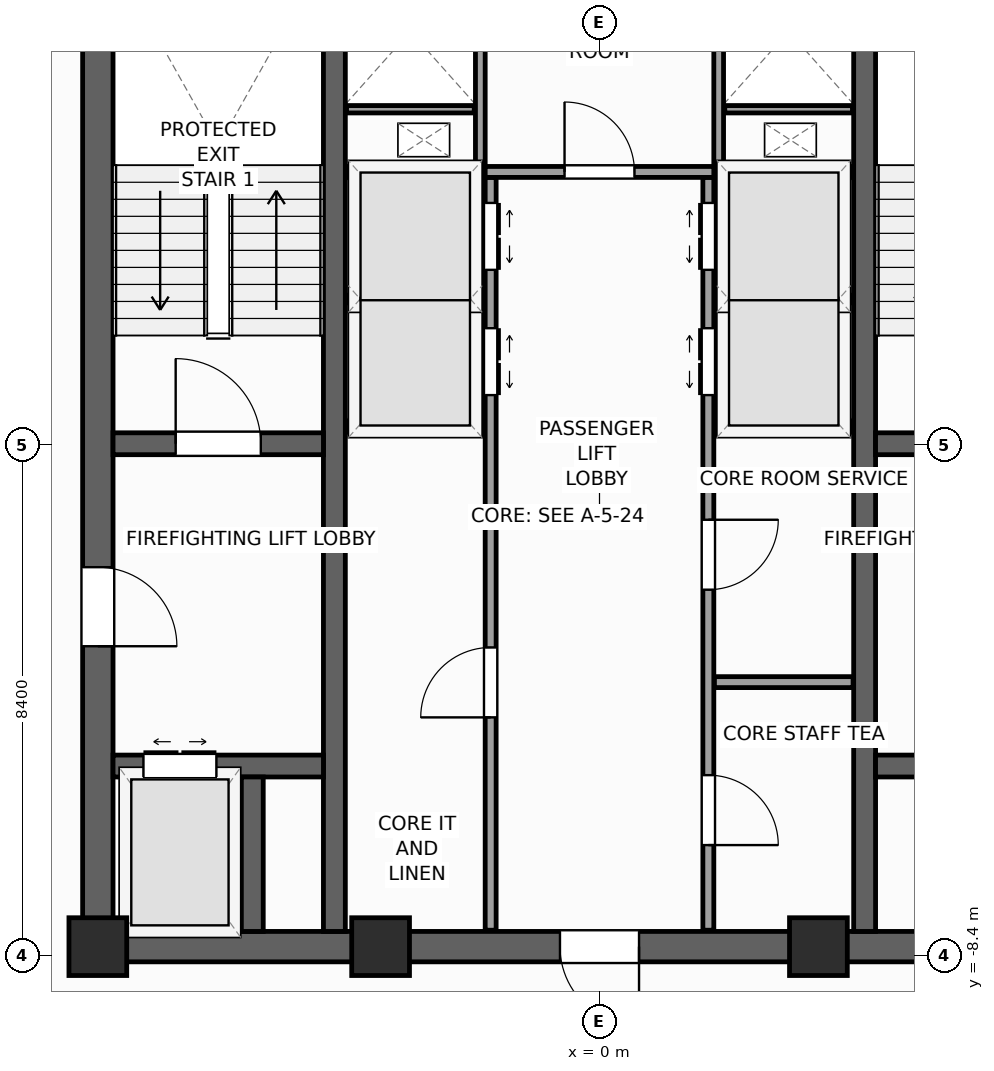
"""IFC4 building model, lengths in metres.
Left out: names, types, materials, properties, quantities, classifications, styles, units other than length and angle.
Written with IfcOpenShell. Run it as: python <this file> out.ifc"""

import sys

from ifc_helpers import new_model, si_unit, direction, frame, frame_2d, origin, origin_2d, place, context, subcontext, project, spatial, rectangle, extrude, source, transform, mapped, element, fill, save


model = new_model("IFC4")
c1 = context("Model", 3, precision=1e-05, world=origin(), true_north=direction((0.0, 1.0)))
c2 = subcontext(c1, "Body", "Model", "MODEL_VIEW")
j1 = project(units=[si_unit("LENGTHUNIT", "METRE"), si_unit("PLANEANGLEUNIT", "RADIAN")], contexts=[c1])
p1 = place(None, origin())
s1 = spatial("IfcSite", under=j1, at=p1, CompositionType="ELEMENT")
p2 = place(p1, origin())
s2 = spatial("IfcBuilding", under=s1, at=p2, CompositionType="ELEMENT")
p3 = place(p2, frame((0.0, 0.0, 252.4)))
s3 = spatial("IfcBuildingStorey", under=s2, at=p3, CompositionType="ELEMENT", Elevation=252.4)
p4 = place(p3, frame((-8.5, -8.25, 0.0), z_axis=(0.0, 0.0, 1.0), x_axis=(1.0, 0.0, 0.0)))
e1 = element("IfcWall", 1, at=p4, inside=s3, PredefinedType="SHEAR", context=c2, shape_type="SweptSolid", body=[
    extrude(rectangle(XDim=17.0, YDim=0.5, at=frame_2d((8.5, 0.0))), origin(), (0.0, 0.0, 1.0), 3.9),
])
p5 = place(p4, frame((7.85, 0.0, 0.0)))
e2 = element("IfcOpeningElement", 2, at=p5, cuts=e1, PredefinedType="OPENING", context=c2, shape_type="SweptSolid", body=[
    extrude(rectangle(XDim=1.3, YDim=2.2, at=frame_2d((0.65, 1.1))), frame((0.0, 0.26, 0.0), z_axis=(0.0, -1.0, 0.0), x_axis=(1.0, 0.0, 0.0)), (0.0, 0.0, 1.0), 0.52),
])
p6 = place(p3, frame((-8.25, -8.0, 0.0), z_axis=(0.0, 0.0, 1.0), x_axis=(0.0, 1.0, 0.0)))
e3 = element("IfcWall", 3, at=p6, inside=s3, PredefinedType="SHEAR", context=c2, shape_type="SweptSolid", body=[
    extrude(rectangle(XDim=16.0, YDim=0.5, at=frame_2d((8.0, 0.0))), origin(), (0.0, 0.0, 1.0), 3.9),
])
p7 = place(p6, frame((4.69, 0.0, 0.0)))
e4 = element("IfcOpeningElement", 4, at=p7, cuts=e3, PredefinedType="OPENING", context=c2, shape_type="SweptSolid", body=[
    extrude(rectangle(XDim=1.3, YDim=2.2, at=frame_2d((0.65, 1.1))), frame((0.0, 0.26, 0.0), z_axis=(0.0, -1.0, 0.0), x_axis=(1.0, 0.0, 0.0)), (0.0, 0.0, 1.0), 0.52),
])
for number, where, z_axis, x_axis in (
    (5, (-4.36, -8.0, 0.0), (0.0, 0.0, 1.0), (0.0, 1.0, 0.0)),
    (6, (4.36, -8.0, 0.0), (0.0, 0.0, 1.0), (0.0, 1.0, 0.0)),
):
    element("IfcWall", number, at=place(p3, frame(where, z_axis=z_axis, x_axis=x_axis)), inside=s3, PredefinedType="SHEAR", context=c2, shape_type="SweptSolid", body=[
        extrude(rectangle(XDim=16.0, YDim=0.36, at=frame_2d((8.0, 0.0))), origin(), (0.0, 0.0, 1.0), 3.9),
    ])
p8 = place(p3, frame((-8.0, 0.02, 0.0), z_axis=(0.0, 0.0, 1.0), x_axis=(1.0, 0.0, 0.0)))
e7 = element("IfcWall", 7, at=p8, inside=s3, PredefinedType="SHEAR", context=c2, shape_type="SweptSolid", body=[
    extrude(rectangle(XDim=3.46, YDim=0.36, at=frame_2d((1.73, 0.0))), origin(), (0.0, 0.0, 1.0), 3.9),
])
p9 = place(p8, frame((1.03, 0.0, 0.0)))
e8 = element("IfcOpeningElement", 8, at=p9, cuts=e7, PredefinedType="OPENING", context=c2, shape_type="SweptSolid", body=[
    extrude(rectangle(XDim=1.4, YDim=2.2, at=frame_2d((0.7, 1.1))), frame((0.0, 0.19, 0.0), z_axis=(0.0, -1.0, 0.0), x_axis=(1.0, 0.0, 0.0)), (0.0, 0.0, 1.0), 0.38),
])
p10 = place(p3, frame((4.54, 0.02, 0.0), z_axis=(0.0, 0.0, 1.0), x_axis=(1.0, 0.0, 0.0)))
e9 = element("IfcWall", 9, at=p10, inside=s3, PredefinedType="SHEAR", context=c2, shape_type="SweptSolid", body=[
    extrude(rectangle(XDim=3.46, YDim=0.36, at=frame_2d((1.73, 0.0))), origin(), (0.0, 0.0, 1.0), 3.9),
])
p11 = place(p10, frame((1.03, 0.0, 0.0)))
e10 = element("IfcOpeningElement", 10, at=p11, cuts=e9, PredefinedType="OPENING", context=c2, shape_type="SweptSolid", body=[
    extrude(rectangle(XDim=1.4, YDim=2.2, at=frame_2d((0.7, 1.1))), frame((0.0, 0.19, 0.0), z_axis=(0.0, -1.0, 0.0), x_axis=(1.0, 0.0, 0.0)), (0.0, 0.0, 1.0), 0.38),
])
p12 = place(p3, frame((-8.0, -5.28, 0.0), z_axis=(0.0, 0.0, 1.0), x_axis=(1.0, 0.0, 0.0)))
e11 = element("IfcWall", 11, at=p12, inside=s3, PredefinedType="SHEAR", context=c2, shape_type="SweptSolid", body=[
    extrude(rectangle(XDim=3.46, YDim=0.36, at=frame_2d((1.73, 0.0))), origin(), (0.0, 0.0, 1.0), 3.9),
])
p13 = place(p12, frame((0.5, 0.0, 0.0)))
e12 = element("IfcOpeningElement", 12, at=p13, cuts=e11, PredefinedType="OPENING", context=c2, shape_type="SweptSolid", body=[
    extrude(rectangle(XDim=1.2, YDim=2.25, at=frame_2d((0.6, 1.125))), frame((0.0, 0.19, 0.0), z_axis=(0.0, -1.0, 0.0), x_axis=(1.0, 0.0, 0.0)), (0.0, 0.0, 1.0), 0.38),
])
p14 = place(p3, frame((4.54, -5.28, 0.0), z_axis=(0.0, 0.0, 1.0), x_axis=(1.0, 0.0, 0.0)))
e13 = element("IfcWall", 13, at=p14, inside=s3, PredefinedType="SHEAR", context=c2, shape_type="SweptSolid", body=[
    extrude(rectangle(XDim=3.46, YDim=0.36, at=frame_2d((1.73, 0.0))), origin(), (0.0, 0.0, 1.0), 3.9),
])
p15 = place(p14, frame((1.76, 0.0, 0.0)))
e14 = element("IfcOpeningElement", 14, at=p15, cuts=e13, PredefinedType="OPENING", context=c2, shape_type="SweptSolid", body=[
    extrude(rectangle(XDim=1.2, YDim=2.25, at=frame_2d((0.6, 1.125))), frame((0.0, 0.19, 0.0), z_axis=(0.0, -1.0, 0.0), x_axis=(1.0, 0.0, 0.0)), (0.0, 0.0, 1.0), 0.38),
])
p16 = place(p3, frame((-5.71, -8.0, 0.0), z_axis=(0.0, 0.0, 1.0), x_axis=(0.0, 1.0, 0.0)))
e15 = element("IfcWall", 15, at=p16, inside=s3, PredefinedType="SHEAR", context=c2, shape_type="SweptSolid", body=[
    extrude(rectangle(XDim=2.54, YDim=0.36, at=frame_2d((1.27, 0.0))), origin(), (0.0, 0.0, 1.0), 3.9),
])
m1 = source(origin(), c2, "Body", "SweptSolid", [
    extrude(rectangle(XDim=0.95, YDim=0.95, at=origin_2d()), origin(), (0.0, 0.0, 1.0), 3.9),
])
for number, where, z_axis, x_axis in (
    (16, (-8.25, -8.25, 0.0), (0.0, 0.0, 1.0), (1.0, 0.0, 0.0)),
    (17, (-3.6, -8.25, 0.0), (0.0, 0.0, 1.0), (1.0, 0.0, 0.0)),
    (18, (3.6, -8.25, 0.0), (0.0, 0.0, 1.0), (1.0, 0.0, 0.0)),
):
    element("IfcColumn", number, at=place(p3, frame(where, z_axis=z_axis, x_axis=x_axis)), inside=s3, PredefinedType="PILASTER", context=c2, shape_type="MappedRepresentation", body=[
        mapped(m1, transform((0.0, 0.0, 0.0), scale=1.0)),
    ])
p17 = place(p3, frame((-6.733, 29.154, 0.0), z_axis=(0.0, 0.0, 1.0), x_axis=(-0.629325378072, -0.77714192302, 0.0)))
e19 = element("IfcWall", 19, at=p17, inside=s3, PredefinedType="STANDARD", context=c2, shape_type="SweptSolid", body=[
    extrude(rectangle(XDim=36.84, YDim=0.34, at=frame_2d((18.42, 0.0))), origin(), (0.0, 0.0, 1.0), 2.96),
])
p18 = place(p17, frame((3.721, 0.0, 0.48)))
e20 = element("IfcOpeningElement", 20, at=p18, cuts=e19, PredefinedType="OPENING", context=c2, shape_type="SweptSolid", body=[
    extrude(rectangle(XDim=1.4, YDim=2.4, at=frame_2d((0.7, 1.2))), frame((0.0, 0.18, 0.0), z_axis=(0.0, -1.0, 0.0), x_axis=(1.0, 0.0, 0.0)), (0.0, 0.0, 1.0), 0.36),
])
p19 = place(p17, frame((10.559, 0.0, 0.58)))
e21 = element("IfcOpeningElement", 21, at=p19, cuts=e19, PredefinedType="OPENING", context=c2, shape_type="SweptSolid", body=[
    extrude(rectangle(XDim=1.75, YDim=2.3, at=frame_2d((0.875, 1.15))), frame((0.0, 0.18, 0.0), z_axis=(0.0, -1.0, 0.0), x_axis=(1.0, 0.0, 0.0)), (0.0, 0.0, 1.0), 0.36),
])
p20 = place(p17, frame((16.058, 0.0, 0.58)))
e22 = element("IfcOpeningElement", 22, at=p20, cuts=e19, PredefinedType="OPENING", context=c2, shape_type="SweptSolid", body=[
    extrude(rectangle(XDim=1.75, YDim=2.3, at=frame_2d((0.875, 1.15))), frame((0.0, 0.18, 0.0), z_axis=(0.0, -1.0, 0.0), x_axis=(1.0, 0.0, 0.0)), (0.0, 0.0, 1.0), 0.36),
])
p21 = place(p17, frame((24.176, 0.0, 0.58)))
e23 = element("IfcOpeningElement", 23, at=p21, cuts=e19, PredefinedType="OPENING", context=c2, shape_type="SweptSolid", body=[
    extrude(rectangle(XDim=1.75, YDim=2.3, at=frame_2d((0.875, 1.15))), frame((0.0, 0.18, 0.0), z_axis=(0.0, -1.0, 0.0), x_axis=(1.0, 0.0, 0.0)), (0.0, 0.0, 1.0), 0.36),
])
p22 = place(p17, frame((30.232, 0.0, 0.48)))
e24 = element("IfcOpeningElement", 24, at=p22, cuts=e19, PredefinedType="OPENING", context=c2, shape_type="SweptSolid", body=[
    extrude(rectangle(XDim=1.4, YDim=2.4, at=frame_2d((0.7, 1.2))), frame((0.0, 0.18, 0.0), z_axis=(0.0, -1.0, 0.0), x_axis=(1.0, 0.0, 0.0)), (0.0, 0.0, 1.0), 0.36),
])
p23 = place(p3, frame((-29.154, -6.733, 0.0), z_axis=(0.0, 0.0, 1.0), x_axis=(0.77714192302, -0.629325378072, 0.0)))
e25 = element("IfcWall", 25, at=p23, inside=s3, PredefinedType="STANDARD", context=c2, shape_type="SweptSolid", body=[
    extrude(rectangle(XDim=36.84, YDim=0.34, at=frame_2d((18.42, 0.0))), origin(), (0.0, 0.0, 1.0), 2.96),
])
p24 = place(p23, frame((23.495, 0.0, 0.0)))
e26 = element("IfcOpeningElement", 26, at=p24, cuts=e25, PredefinedType="OPENING", context=c2, shape_type="SweptSolid", body=[
    extrude(rectangle(XDim=1.05, YDim=2.25, at=frame_2d((0.525, 1.125))), frame((0.0, 0.18, 0.0), z_axis=(0.0, -1.0, 0.0), x_axis=(1.0, 0.0, 0.0)), (0.0, 0.0, 1.0), 0.36),
])
p25 = place(p23, frame((3.721, 0.0, 0.48)))
e27 = element("IfcOpeningElement", 27, at=p25, cuts=e25, PredefinedType="OPENING", context=c2, shape_type="SweptSolid", body=[
    extrude(rectangle(XDim=1.4, YDim=2.4, at=frame_2d((0.7, 1.2))), frame((0.0, 0.18, 0.0), z_axis=(0.0, -1.0, 0.0), x_axis=(1.0, 0.0, 0.0)), (0.0, 0.0, 1.0), 0.36),
])
p26 = place(p23, frame((9.809, 0.0, 0.58)))
e28 = element("IfcOpeningElement", 28, at=p26, cuts=e25, PredefinedType="OPENING", context=c2, shape_type="SweptSolid", body=[
    extrude(rectangle(XDim=1.75, YDim=2.3, at=frame_2d((0.875, 1.15))), frame((0.0, 0.18, 0.0), z_axis=(0.0, -1.0, 0.0), x_axis=(1.0, 0.0, 0.0)), (0.0, 0.0, 1.0), 0.36),
])
p27 = place(p23, frame((16.058, 0.0, 0.58)))
e29 = element("IfcOpeningElement", 29, at=p27, cuts=e25, PredefinedType="OPENING", context=c2, shape_type="SweptSolid", body=[
    extrude(rectangle(XDim=1.75, YDim=2.3, at=frame_2d((0.875, 1.15))), frame((0.0, 0.18, 0.0), z_axis=(0.0, -1.0, 0.0), x_axis=(1.0, 0.0, 0.0)), (0.0, 0.0, 1.0), 0.36),
])
p28 = place(p23, frame((25.676, 0.0, 0.58)))
e30 = element("IfcOpeningElement", 30, at=p28, cuts=e25, PredefinedType="OPENING", context=c2, shape_type="SweptSolid", body=[
    extrude(rectangle(XDim=1.75, YDim=2.3, at=frame_2d((0.875, 1.15))), frame((0.0, 0.18, 0.0), z_axis=(0.0, -1.0, 0.0), x_axis=(1.0, 0.0, 0.0)), (0.0, 0.0, 1.0), 0.36),
])
p29 = place(p23, frame((30.982, 0.0, 0.48)))
e31 = element("IfcOpeningElement", 31, at=p29, cuts=e25, PredefinedType="OPENING", context=c2, shape_type="SweptSolid", body=[
    extrude(rectangle(XDim=1.4, YDim=2.4, at=frame_2d((0.7, 1.2))), frame((0.0, 0.18, 0.0), z_axis=(0.0, -1.0, 0.0), x_axis=(1.0, 0.0, 0.0)), (0.0, 0.0, 1.0), 0.36),
])
p30 = place(p3, frame((-1.79, -7.98, 0.0), z_axis=(0.0, 0.0, 1.0), x_axis=(0.0, 1.0, 0.0)))
e32 = element("IfcWall", 32, at=p30, inside=s3, PredefinedType="PARTITIONING", context=c2, shape_type="SweptSolid", body=[
    extrude(rectangle(XDim=12.38, YDim=0.18, at=frame_2d((6.19, 0.0))), origin(), (0.0, 0.0, 1.0), 3.66),
])
p31 = place(p30, frame((8.8, 0.0, 0.0)))
e33 = element("IfcOpeningElement", 33, at=p31, cuts=e32, PredefinedType="OPENING", context=c2, shape_type="SweptSolid", body=[
    extrude(rectangle(XDim=1.1, YDim=2.2, at=frame_2d((0.55, 1.1))), frame((0.0, 0.1, 0.0), z_axis=(0.0, -1.0, 0.0), x_axis=(1.0, 0.0, 0.0)), (0.0, 0.0, 1.0), 0.2),
])
p32 = place(p30, frame((10.86, 0.0, 0.0)))
e34 = element("IfcOpeningElement", 34, at=p32, cuts=e32, PredefinedType="OPENING", context=c2, shape_type="SweptSolid", body=[
    extrude(rectangle(XDim=1.1, YDim=2.2, at=frame_2d((0.55, 1.1))), frame((0.0, 0.1, 0.0), z_axis=(0.0, -1.0, 0.0), x_axis=(1.0, 0.0, 0.0)), (0.0, 0.0, 1.0), 0.2),
])
p33 = place(p30, frame((3.5, 0.0, 0.0)))
e35 = element("IfcOpeningElement", 35, at=p33, cuts=e32, PredefinedType="OPENING", context=c2, shape_type="SweptSolid", body=[
    extrude(rectangle(XDim=1.15, YDim=2.25, at=frame_2d((0.575, 1.125))), frame((0.0, 0.1, 0.0), z_axis=(0.0, -1.0, 0.0), x_axis=(1.0, 0.0, 0.0)), (0.0, 0.0, 1.0), 0.2),
])
p34 = place(p3, frame((1.79, -7.98, 0.0), z_axis=(0.0, 0.0, 1.0), x_axis=(0.0, 1.0, 0.0)))
e36 = element("IfcWall", 36, at=p34, inside=s3, PredefinedType="PARTITIONING", context=c2, shape_type="SweptSolid", body=[
    extrude(rectangle(XDim=12.38, YDim=0.18, at=frame_2d((6.19, 0.0))), origin(), (0.0, 0.0, 1.0), 3.66),
])
p35 = place(p34, frame((8.8, 0.0, 0.0)))
e37 = element("IfcOpeningElement", 37, at=p35, cuts=e36, PredefinedType="OPENING", context=c2, shape_type="SweptSolid", body=[
    extrude(rectangle(XDim=1.1, YDim=2.2, at=frame_2d((0.55, 1.1))), frame((0.0, 0.1, 0.0), z_axis=(0.0, -1.0, 0.0), x_axis=(1.0, 0.0, 0.0)), (0.0, 0.0, 1.0), 0.2),
])
p36 = place(p34, frame((10.86, 0.0, 0.0)))
e38 = element("IfcOpeningElement", 38, at=p36, cuts=e36, PredefinedType="OPENING", context=c2, shape_type="SweptSolid", body=[
    extrude(rectangle(XDim=1.1, YDim=2.2, at=frame_2d((0.55, 1.1))), frame((0.0, 0.1, 0.0), z_axis=(0.0, -1.0, 0.0), x_axis=(1.0, 0.0, 0.0)), (0.0, 0.0, 1.0), 0.2),
])
p37 = place(p34, frame((1.4, 0.0, 0.0)))
e39 = element("IfcOpeningElement", 39, at=p37, cuts=e36, PredefinedType="OPENING", context=c2, shape_type="SweptSolid", body=[
    extrude(rectangle(XDim=1.15, YDim=2.25, at=frame_2d((0.575, 1.125))), frame((0.0, 0.1, 0.0), z_axis=(0.0, -1.0, 0.0), x_axis=(1.0, 0.0, 0.0)), (0.0, 0.0, 1.0), 0.2),
])
p38 = place(p34, frame((5.6, 0.0, 0.0)))
e40 = element("IfcOpeningElement", 40, at=p38, cuts=e36, PredefinedType="OPENING", context=c2, shape_type="SweptSolid", body=[
    extrude(rectangle(XDim=1.15, YDim=2.25, at=frame_2d((0.575, 1.125))), frame((0.0, 0.1, 0.0), z_axis=(0.0, -1.0, 0.0), x_axis=(1.0, 0.0, 0.0)), (0.0, 0.0, 1.0), 0.2),
])
p39 = place(p3, frame((-1.88, 4.49, 0.0), z_axis=(0.0, 0.0, 1.0), x_axis=(1.0, 0.0, 0.0)))
e41 = element("IfcWall", 41, at=p39, inside=s3, PredefinedType="PARTITIONING", context=c2, shape_type="SweptSolid", body=[
    extrude(rectangle(XDim=3.76, YDim=0.18, at=frame_2d((1.88, 0.0))), origin(), (0.0, 0.0, 1.0), 3.66),
])
p40 = place(p39, frame((1.305, 0.0, 0.0)))
e42 = element("IfcOpeningElement", 42, at=p40, cuts=e41, PredefinedType="OPENING", context=c2, shape_type="SweptSolid", body=[
    extrude(rectangle(XDim=1.15, YDim=2.25, at=frame_2d((0.575, 1.125))), frame((0.0, 0.1, 0.0), z_axis=(0.0, -1.0, 0.0), x_axis=(1.0, 0.0, 0.0)), (0.0, 0.0, 1.0), 0.2),
])
for number, where, z_axis, x_axis in (
    (43, (1.89, -3.9, 0.0), (0.0, 0.0, 1.0), (1.0, 0.0, 0.0)),
    (44, (-4.17, 0.3, 0.0), (0.0, 0.0, 1.0), (1.0, 0.0, 0.0)),
    (45, (1.89, 0.3, 0.0), (0.0, 0.0, 1.0), (1.0, 0.0, 0.0)),
    (46, (-4.17, 4.49, 0.0), (0.0, 0.0, 1.0), (1.0, 0.0, 0.0)),
    (47, (1.89, 4.49, 0.0), (0.0, 0.0, 1.0), (1.0, 0.0, 0.0)),
):
    element("IfcWall", number, at=place(p3, frame(where, z_axis=z_axis, x_axis=x_axis)), inside=s3, PredefinedType="PARTITIONING", context=c2, shape_type="SweptSolid", body=[
        extrude(rectangle(XDim=2.28, YDim=0.18, at=frame_2d((1.14, 0.0))), origin(), (0.0, 0.0, 1.0), 3.66),
    ])
for number, where, z_axis, x_axis in (
    (48, (-4.16, 2.4, 0.0), (0.0, 0.0, 1.0), (1.0, 0.0, 0.0)),
    (49, (1.9, 2.4, 0.0), (0.0, 0.0, 1.0), (1.0, 0.0, 0.0)),
):
    element("IfcWall", number, at=place(p3, frame(where, z_axis=z_axis, x_axis=x_axis)), inside=s3, PredefinedType="PARTITIONING", context=c2, shape_type="SweptSolid", body=[
        extrude(rectangle(XDim=2.26, YDim=0.12, at=frame_2d((1.13, 0.0))), origin(), (0.0, 0.0, 1.0), 3.66),
    ])
for number, where, z_axis, x_axis in (
    (50, (-1.96, 4.58, 0.0), (0.0, 0.0, 1.0), (0.0, 1.0, 0.0)),
    (51, (1.96, 4.58, 0.0), (0.0, 0.0, 1.0), (0.0, 1.0, 0.0)),
):
    element("IfcWall", number, at=place(p3, frame(where, z_axis=z_axis, x_axis=x_axis)), inside=s3, PredefinedType="PARTITIONING", context=c2, shape_type="SweptSolid", body=[
        extrude(rectangle(XDim=3.4, YDim=0.16, at=frame_2d((1.7, 0.0))), origin(), (0.0, 0.0, 1.0), 3.66),
    ])
for number, where, z_axis, x_axis in (
    (52, (-4.16, 5.52, 0.0), (0.0, 0.0, 1.0), (1.0, 0.0, 0.0)),
    (53, (2.06, 5.52, 0.0), (0.0, 0.0, 1.0), (1.0, 0.0, 0.0)),
):
    element("IfcWall", number, at=place(p3, frame(where, z_axis=z_axis, x_axis=x_axis)), inside=s3, PredefinedType="PARTITIONING", context=c2, shape_type="SweptSolid", body=[
        extrude(rectangle(XDim=2.1, YDim=0.12, at=frame_2d((1.05, 0.0))), origin(), (0.0, 0.0, 1.0), 3.66),
    ])
m2 = source(origin(), c2, "Body", "SweptSolid", [
    extrude(rectangle(XDim=1.4, YDim=2.2, at=frame_2d((0.7, 1.1))), frame((0.0, 0.025, 0.0), z_axis=(0.0, -1.0, 0.0), x_axis=(1.0, 0.0, 0.0)), (0.0, 0.0, 1.0), 0.05),
])
p41 = place(p9, origin())
e54 = element("IfcDoor", 54, at=p41, inside=s3, OperationType="SINGLE_SWING_LEFT", PredefinedType="DOOR", context=c2, shape_type="MappedRepresentation", body=[
    mapped(m2, transform((0.0, 0.0, 0.0), scale=1.0)),
])
fill(e8, e54)
m3 = source(origin(), c2, "Body", "SweptSolid", [
    extrude(rectangle(XDim=1.3, YDim=2.2, at=frame_2d((0.65, 1.1))), frame((0.0, 0.025, 0.0), z_axis=(0.0, -1.0, 0.0), x_axis=(1.0, 0.0, 0.0)), (0.0, 0.0, 1.0), 0.05),
])
p42 = place(p7, frame((1.3, 0.0, 0.0), z_axis=(0.0, 0.0, 1.0), x_axis=(-1.0, 0.0, 0.0)))
e55 = element("IfcDoor", 55, at=p42, inside=s3, OperationType="SINGLE_SWING_LEFT", PredefinedType="DOOR", context=c2, shape_type="MappedRepresentation", body=[
    mapped(m3, transform((0.0, 0.0, 0.0), scale=1.0)),
])
fill(e4, e55)
p43 = place(p5, frame((1.3, 0.0, 0.0), z_axis=(0.0, 0.0, 1.0), x_axis=(-1.0, 0.0, 0.0)))
e56 = element("IfcDoor", 56, at=p43, inside=s3, OperationType="SINGLE_SWING_RIGHT", PredefinedType="DOOR", context=c2, shape_type="MappedRepresentation", body=[
    mapped(m3, transform((0.0, 0.0, 0.0), scale=1.0)),
])
fill(e2, e56)
m4 = source(origin(), c2, "Body", "SweptSolid", [
    extrude(rectangle(XDim=1.2, YDim=2.25, at=frame_2d((0.6, 1.125))), frame((0.0, 0.025, 0.0), z_axis=(0.0, -1.0, 0.0), x_axis=(1.0, 0.0, 0.0)), (0.0, 0.0, 1.0), 0.05),
])
p44 = place(p13, origin())
e57 = element("IfcDoor", 57, at=p44, inside=s3, OperationType="DOUBLE_DOOR_SLIDING", PredefinedType="DOOR", context=c2, shape_type="MappedRepresentation", body=[
    mapped(m4, transform((0.0, 0.0, 0.0), scale=1.0)),
])
fill(e12, e57)
m5 = source(origin(), c2, "Body", "SweptSolid", [
    extrude(rectangle(XDim=1.1, YDim=2.2, at=frame_2d((0.55, 1.1))), frame((0.0, 0.025, 0.0), z_axis=(0.0, -1.0, 0.0), x_axis=(1.0, 0.0, 0.0)), (0.0, 0.0, 1.0), 0.05),
])
p45 = place(p31, frame((1.1, 0.0, 0.0), z_axis=(0.0, 0.0, 1.0), x_axis=(-1.0, 0.0, 0.0)))
e58 = element("IfcDoor", 58, at=p45, inside=s3, OperationType="DOUBLE_DOOR_SLIDING", PredefinedType="DOOR", context=c2, shape_type="MappedRepresentation", body=[
    mapped(m5, transform((0.0, 0.0, 0.0), scale=1.0)),
])
fill(e33, e58)
p46 = place(p32, frame((1.1, 0.0, 0.0), z_axis=(0.0, 0.0, 1.0), x_axis=(-1.0, 0.0, 0.0)))
e59 = element("IfcDoor", 59, at=p46, inside=s3, OperationType="DOUBLE_DOOR_SLIDING", PredefinedType="DOOR", context=c2, shape_type="MappedRepresentation", body=[
    mapped(m5, transform((0.0, 0.0, 0.0), scale=1.0)),
])
fill(e34, e59)
p47 = place(p35, origin())
e60 = element("IfcDoor", 60, at=p47, inside=s3, OperationType="DOUBLE_DOOR_SLIDING", PredefinedType="DOOR", context=c2, shape_type="MappedRepresentation", body=[
    mapped(m5, transform((0.0, 0.0, 0.0), scale=1.0)),
])
fill(e37, e60)
p48 = place(p36, origin())
e61 = element("IfcDoor", 61, at=p48, inside=s3, OperationType="DOUBLE_DOOR_SLIDING", PredefinedType="DOOR", context=c2, shape_type="MappedRepresentation", body=[
    mapped(m5, transform((0.0, 0.0, 0.0), scale=1.0)),
])
fill(e38, e61)
m6 = source(origin(), c2, "Body", "SweptSolid", [
    extrude(rectangle(XDim=1.15, YDim=2.25, at=frame_2d((0.575, 1.125))), frame((0.0, 0.025, 0.0), z_axis=(0.0, -1.0, 0.0), x_axis=(1.0, 0.0, 0.0)), (0.0, 0.0, 1.0), 0.05),
])
p49 = place(p33, origin())
e62 = element("IfcDoor", 62, at=p49, inside=s3, OperationType="SINGLE_SWING_LEFT", PredefinedType="DOOR", context=c2, shape_type="MappedRepresentation", body=[
    mapped(m6, transform((0.0, 0.0, 0.0), scale=1.0)),
])
fill(e35, e62)
p50 = place(p37, frame((1.15, 0.0, 0.0), z_axis=(0.0, 0.0, 1.0), x_axis=(-1.0, 0.0, 0.0)))
e63 = element("IfcDoor", 63, at=p50, inside=s3, OperationType="SINGLE_SWING_LEFT", PredefinedType="DOOR", context=c2, shape_type="MappedRepresentation", body=[
    mapped(m6, transform((0.0, 0.0, 0.0), scale=1.0)),
])
fill(e39, e63)
p51 = place(p38, frame((1.15, 0.0, 0.0), z_axis=(0.0, 0.0, 1.0), x_axis=(-1.0, 0.0, 0.0)))
e64 = element("IfcDoor", 64, at=p51, inside=s3, OperationType="SINGLE_SWING_RIGHT", PredefinedType="DOOR", context=c2, shape_type="MappedRepresentation", body=[
    mapped(m6, transform((0.0, 0.0, 0.0), scale=1.0)),
])
fill(e40, e64)
p52 = place(p40, origin())
e65 = element("IfcDoor", 65, at=p52, inside=s3, OperationType="SINGLE_SWING_LEFT", PredefinedType="DOOR", context=c2, shape_type="MappedRepresentation", body=[
    mapped(m6, transform((0.0, 0.0, 0.0), scale=1.0)),
])
fill(e42, e65)
save(model, sys.argv[1])
